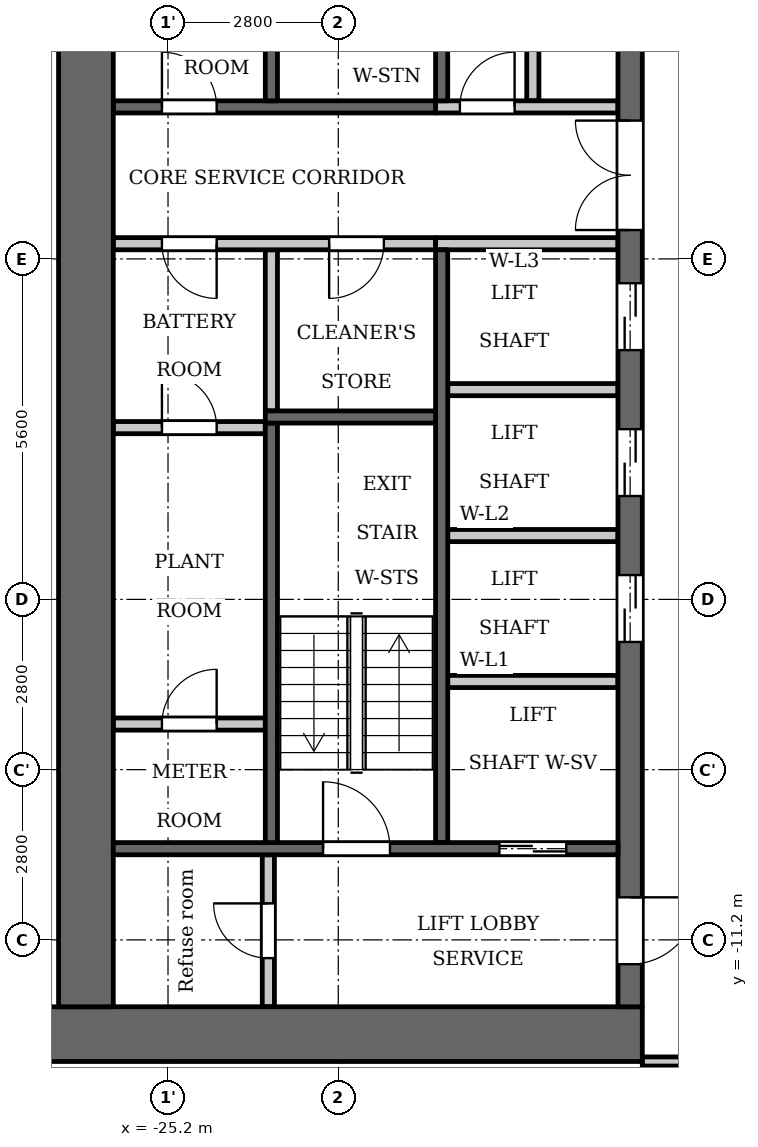
"""IFC4 building model, lengths in metres.
Left out: names, types, materials, properties, quantities, classifications, styles, units other than length and angle.
Written with IfcOpenShell. Run it as: python <this file> out.ifc"""

import sys

from ifc_helpers import new_model, si_unit, direction, frame, frame_2d, origin, place, context, subcontext, project, spatial, rectangle, extrude, element, fill, save


model = new_model("IFC4")
c1 = context("Model", 3, precision=1e-05, world=origin(), true_north=direction((0.0, 1.0)))
c2 = subcontext(c1, "Body", "Model", "MODEL_VIEW")
j1 = project(units=[si_unit("LENGTHUNIT", "METRE"), si_unit("PLANEANGLEUNIT", "RADIAN")], contexts=[c1])
p1 = place(None, origin())
s1 = spatial("IfcSite", under=j1, at=p1, CompositionType="ELEMENT")
p2 = place(p1, origin())
s2 = spatial("IfcBuilding", under=s1, at=p2, CompositionType="ELEMENT")
p3 = place(p2, frame((0.0, 0.0, 48.0)))
s3 = spatial("IfcBuildingStorey", under=s2, at=p3, CompositionType="ELEMENT", Elevation=48.0)
p4 = place(p3, frame((-23.5, -2.5, 0.0), z_axis=(0.0, 0.0, 1.0), x_axis=(0.0, 1.0, 0.0)))
e1 = element("IfcWall", 1, at=p4, inside=s3, PredefinedType="PARTITIONING", context=c2, shape_type="SweptSolid", body=[
    extrude(rectangle(XDim=2.65, YDim=0.2, at=frame_2d((1.325, 0.0))), origin(), (0.0, 0.0, 1.0), 3.2),
])
p5 = place(p3, frame((-20.7, 2.6, 0.0), z_axis=(0.0, 0.0, 1.0), x_axis=(0.0, 1.0, 0.0)))
e2 = element("IfcWall", 2, at=p5, inside=s3, PredefinedType="SHEAR", context=c2, shape_type="SweptSolid", body=[
    extrude(rectangle(XDim=7.0, YDim=0.2, at=frame_2d((3.5, 0.0))), origin(), (0.0, 0.0, 1.0), 3.2),
])
p6 = place(p3, frame((-20.7, -9.6, 0.0), z_axis=(0.0, 0.0, 1.0), x_axis=(0.0, 1.0, 0.0)))
e3 = element("IfcWall", 3, at=p6, inside=s3, PredefinedType="SHEAR", context=c2, shape_type="SweptSolid", body=[
    extrude(rectangle(XDim=9.75, YDim=0.2, at=frame_2d((4.875, 0.0))), origin(), (0.0, 0.0, 1.0), 3.2),
])
p7 = place(p3, frame((-20.8, 2.5, 0.0), z_axis=(0.0, 0.0, 1.0), x_axis=(-1.0, 0.0, 0.0)))
e4 = element("IfcWall", 4, at=p7, inside=s3, PredefinedType="SHEAR", context=c2, shape_type="SweptSolid", body=[
    extrude(rectangle(XDim=5.3, YDim=0.2, at=frame_2d((2.65, 0.0))), origin(), (0.0, 0.0, 1.0), 3.2),
])
p8 = place(p7, frame((3.6, 0.0, 0.0)))
e5 = element("IfcOpeningElement", 5, at=p8, cuts=e4, PredefinedType="OPENING", context=c2, shape_type="SweptSolid", body=[
    extrude(rectangle(XDim=0.9, YDim=2.1, at=frame_2d((0.45, 1.05))), frame((0.0, 0.11, 0.0), z_axis=(0.0, -1.0, 0.0), x_axis=(1.0, 0.0, 0.0)), (0.0, 0.0, 1.0), 0.22),
])
p9 = place(p3, frame((-20.8, 0.25, 0.0), z_axis=(0.0, 0.0, 1.0), x_axis=(-1.0, 0.0, 0.0)))
e6 = element("IfcWall", 6, at=p9, inside=s3, PredefinedType="PARTITIONING", context=c2, shape_type="SweptSolid", body=[
    extrude(rectangle(XDim=5.3, YDim=0.2, at=frame_2d((2.65, 0.0))), origin(), (0.0, 0.0, 1.0), 3.2),
])
p10 = place(p9, frame((0.85, 0.0, 0.0)))
e7 = element("IfcOpeningElement", 7, at=p10, cuts=e6, PredefinedType="OPENING", context=c2, shape_type="SweptSolid", body=[
    extrude(rectangle(XDim=0.9, YDim=2.1, at=frame_2d((0.45, 1.05))), frame((0.0, 0.11, 0.0), z_axis=(0.0, -1.0, 0.0), x_axis=(1.0, 0.0, 0.0)), (0.0, 0.0, 1.0), 0.22),
])
p11 = place(p9, frame((3.6, 0.0, 0.0)))
e8 = element("IfcOpeningElement", 8, at=p11, cuts=e6, PredefinedType="OPENING", context=c2, shape_type="SweptSolid", body=[
    extrude(rectangle(XDim=0.9, YDim=2.1, at=frame_2d((0.45, 1.05))), frame((0.0, 0.11, 0.0), z_axis=(0.0, -1.0, 0.0), x_axis=(1.0, 0.0, 0.0)), (0.0, 0.0, 1.0), 0.22),
])
p12 = place(p3, frame((-17.4, -12.75, 0.0), z_axis=(0.0, 0.0, 1.0), x_axis=(-1.0, 0.0, 0.0)))
e9 = element("IfcWall", 9, at=p12, inside=s3, PredefinedType="SHEAR", context=c2, shape_type="SweptSolid", body=[
    extrude(rectangle(XDim=10.4, YDim=0.9, at=frame_2d((5.2, 0.0))), origin(), (0.0, 0.0, 1.0), 3.2),
])
p13 = place(p3, frame((-19.2, 2.6, 0.0), z_axis=(0.0, 0.0, 1.0), x_axis=(0.0, 1.0, 0.0)))
e10 = element("IfcWall", 10, at=p13, inside=s3, PredefinedType="PARTITIONING", context=c2, shape_type="SweptSolid", body=[
    extrude(rectangle(XDim=4.6, YDim=0.2, at=frame_2d((2.3, 0.0))), origin(), (0.0, 0.0, 1.0), 3.2),
])
p14 = place(p3, frame((-17.6, -12.3, 0.0), z_axis=(0.0, 0.0, 1.0), x_axis=(0.0, 1.0, 0.0)))
e11 = element("IfcWall", 11, at=p14, inside=s3, PredefinedType="SHEAR", context=c2, shape_type="SweptSolid", body=[
    extrude(rectangle(XDim=24.6, YDim=0.4, at=frame_2d((12.3, 0.0))), origin(), (0.0, 0.0, 1.0), 3.2),
])
p15 = place(p14, frame((6.0, 0.0, 0.0)))
e12 = element("IfcOpeningElement", 12, at=p15, cuts=e11, PredefinedType="OPENING", context=c2, shape_type="SweptSolid", body=[
    extrude(rectangle(XDim=1.1, YDim=2.1, at=frame_2d((0.55, 1.05))), frame((0.0, 0.21, 0.0), z_axis=(0.0, -1.0, 0.0), x_axis=(1.0, 0.0, 0.0)), (0.0, 0.0, 1.0), 0.42),
])
p16 = place(p14, frame((8.4, 0.0, 0.0)))
e13 = element("IfcOpeningElement", 13, at=p16, cuts=e11, PredefinedType="OPENING", context=c2, shape_type="SweptSolid", body=[
    extrude(rectangle(XDim=1.1, YDim=2.1, at=frame_2d((0.55, 1.05))), frame((0.0, 0.21, 0.0), z_axis=(0.0, -1.0, 0.0), x_axis=(1.0, 0.0, 0.0)), (0.0, 0.0, 1.0), 0.42),
])
p17 = place(p14, frame((10.8, 0.0, 0.0)))
e14 = element("IfcOpeningElement", 14, at=p17, cuts=e11, PredefinedType="OPENING", context=c2, shape_type="SweptSolid", body=[
    extrude(rectangle(XDim=1.1, YDim=2.1, at=frame_2d((0.55, 1.05))), frame((0.0, 0.21, 0.0), z_axis=(0.0, -1.0, 0.0), x_axis=(1.0, 0.0, 0.0)), (0.0, 0.0, 1.0), 0.42),
])
p18 = place(p14, frame((16.75, 0.0, 0.0)))
e15 = element("IfcOpeningElement", 15, at=p18, cuts=e11, PredefinedType="OPENING", context=c2, shape_type="SweptSolid", body=[
    extrude(rectangle(XDim=0.9, YDim=2.1, at=frame_2d((0.45, 1.05))), frame((0.0, 0.21, 0.0), z_axis=(0.0, -1.0, 0.0), x_axis=(1.0, 0.0, 0.0)), (0.0, 0.0, 1.0), 0.42),
])
p19 = place(p14, frame((22.8, 0.0, 0.0)))
e16 = element("IfcOpeningElement", 16, at=p19, cuts=e11, PredefinedType="OPENING", context=c2, shape_type="SweptSolid", body=[
    extrude(rectangle(XDim=1.1, YDim=2.1, at=frame_2d((0.55, 1.05))), frame((0.0, 0.21, 0.0), z_axis=(0.0, -1.0, 0.0), x_axis=(1.0, 0.0, 0.0)), (0.0, 0.0, 1.0), 0.42),
])
p20 = place(p14, frame((0.7, 0.0, 0.0)))
e17 = element("IfcOpeningElement", 17, at=p20, cuts=e11, PredefinedType="OPENING", context=c2, shape_type="SweptSolid", body=[
    extrude(rectangle(XDim=1.1, YDim=2.1, at=frame_2d((0.55, 1.05))), frame((0.0, 0.21, 0.0), z_axis=(0.0, -1.0, 0.0), x_axis=(1.0, 0.0, 0.0)), (0.0, 0.0, 1.0), 0.42),
])
p21 = place(p14, frame((12.775, 0.0, 0.0)))
e18 = element("IfcOpeningElement", 18, at=p21, cuts=e11, PredefinedType="OPENING", context=c2, shape_type="SweptSolid", body=[
    extrude(rectangle(XDim=1.8, YDim=2.1, at=frame_2d((0.9, 1.05))), frame((0.0, 0.21, 0.0), z_axis=(0.0, -1.0, 0.0), x_axis=(1.0, 0.0, 0.0)), (0.0, 0.0, 1.0), 0.42),
])
p22 = place(p3, frame((-26.55, -12.3, 0.0), z_axis=(0.0, 0.0, 1.0), x_axis=(0.0, 1.0, 0.0)))
e19 = element("IfcWall", 19, at=p22, inside=s3, PredefinedType="SHEAR", context=c2, shape_type="SweptSolid", body=[
    extrude(rectangle(XDim=24.6, YDim=0.9, at=frame_2d((12.3, 0.0))), origin(), (0.0, 0.0, 1.0), 3.2),
])
p23 = place(p3, frame((-23.55, -12.3, 0.0), z_axis=(0.0, 0.0, 1.0), x_axis=(0.0, 1.0, 0.0)))
e20 = element("IfcWall", 20, at=p23, inside=s3, PredefinedType="PARTITIONING", context=c2, shape_type="SweptSolid", body=[
    extrude(rectangle(XDim=2.5, YDim=0.2, at=frame_2d((1.25, 0.0))), origin(), (0.0, 0.0, 1.0), 3.2),
])
p24 = place(p23, frame((0.8, 0.0, 0.0)))
e21 = element("IfcOpeningElement", 21, at=p24, cuts=e20, PredefinedType="OPENING", context=c2, shape_type="SweptSolid", body=[
    extrude(rectangle(XDim=0.9, YDim=2.1, at=frame_2d((0.45, 1.05))), frame((0.0, 0.11, 0.0), z_axis=(0.0, -1.0, 0.0), x_axis=(1.0, 0.0, 0.0)), (0.0, 0.0, 1.0), 0.22),
])
p25 = place(p3, frame((-23.6, -7.65, 0.0), z_axis=(0.0, 0.0, 1.0), x_axis=(-1.0, 0.0, 0.0)))
e22 = element("IfcWall", 22, at=p25, inside=s3, PredefinedType="PARTITIONING", context=c2, shape_type="SweptSolid", body=[
    extrude(rectangle(XDim=2.5, YDim=0.2, at=frame_2d((1.25, 0.0))), origin(), (0.0, 0.0, 1.0), 3.2),
])
p26 = place(p25, frame((0.8, 0.0, 0.0)))
e23 = element("IfcOpeningElement", 23, at=p26, cuts=e22, PredefinedType="OPENING", context=c2, shape_type="SweptSolid", body=[
    extrude(rectangle(XDim=0.9, YDim=2.1, at=frame_2d((0.45, 1.05))), frame((0.0, 0.11, 0.0), z_axis=(0.0, -1.0, 0.0), x_axis=(1.0, 0.0, 0.0)), (0.0, 0.0, 1.0), 0.22),
])
p27 = place(p3, frame((-23.6, -2.775, 0.0), z_axis=(0.0, 0.0, 1.0), x_axis=(-1.0, 0.0, 0.0)))
e24 = element("IfcWall", 24, at=p27, inside=s3, PredefinedType="PARTITIONING", context=c2, shape_type="SweptSolid", body=[
    extrude(rectangle(XDim=2.5, YDim=0.2, at=frame_2d((1.25, 0.0))), origin(), (0.0, 0.0, 1.0), 3.2),
])
p28 = place(p27, frame((0.8, 0.0, 0.0)))
e25 = element("IfcOpeningElement", 25, at=p28, cuts=e24, PredefinedType="OPENING", context=c2, shape_type="SweptSolid", body=[
    extrude(rectangle(XDim=0.9, YDim=2.1, at=frame_2d((0.45, 1.05))), frame((0.0, 0.11, 0.0), z_axis=(0.0, -1.0, 0.0), x_axis=(1.0, 0.0, 0.0)), (0.0, 0.0, 1.0), 0.22),
])
p29 = place(p3, frame((-17.8, -9.7, 0.0), z_axis=(0.0, 0.0, 1.0), x_axis=(-1.0, 0.0, 0.0)))
e26 = element("IfcWall", 26, at=p29, inside=s3, PredefinedType="SHEAR", context=c2, shape_type="SweptSolid", body=[
    extrude(rectangle(XDim=8.3, YDim=0.2, at=frame_2d((4.15, 0.0))), origin(), (0.0, 0.0, 1.0), 3.2),
])
p30 = place(p29, frame((0.85, 0.0, 0.0)))
e27 = element("IfcOpeningElement", 27, at=p30, cuts=e26, PredefinedType="OPENING", context=c2, shape_type="SweptSolid", body=[
    extrude(rectangle(XDim=1.1, YDim=2.1, at=frame_2d((0.55, 1.05))), frame((0.0, 0.11, 0.0), z_axis=(0.0, -1.0, 0.0), x_axis=(1.0, 0.0, 0.0)), (0.0, 0.0, 1.0), 0.22),
])
p31 = place(p29, frame((3.75, 0.0, 0.0)))
e28 = element("IfcOpeningElement", 28, at=p31, cuts=e26, PredefinedType="OPENING", context=c2, shape_type="SweptSolid", body=[
    extrude(rectangle(XDim=1.1, YDim=2.1, at=frame_2d((0.55, 1.05))), frame((0.0, 0.11, 0.0), z_axis=(0.0, -1.0, 0.0), x_axis=(1.0, 0.0, 0.0)), (0.0, 0.0, 1.0), 0.22),
])
for number, where, z_axis, x_axis in (
    (29, (-17.8, -6.95, 0.0), (0.0, 0.0, 1.0), (-1.0, 0.0, 0.0)),
    (30, (-17.8, -4.55, 0.0), (0.0, 0.0, 1.0), (-1.0, 0.0, 0.0)),
    (31, (-17.8, -2.15, 0.0), (0.0, 0.0, 1.0), (-1.0, 0.0, 0.0)),
):
    element("IfcWall", number, at=place(p3, frame(where, z_axis=z_axis, x_axis=x_axis)), inside=s3, PredefinedType="PARTITIONING", context=c2, shape_type="SweptSolid", body=[
        extrude(rectangle(XDim=2.8, YDim=0.2, at=frame_2d((1.4, 0.0))), origin(), (0.0, 0.0, 1.0), 3.2),
    ])
p32 = place(p3, frame((-17.8, 0.25, 0.0), z_axis=(0.0, 0.0, 1.0), x_axis=(-1.0, 0.0, 0.0)))
e32 = element("IfcWall", 32, at=p32, inside=s3, PredefinedType="PARTITIONING", context=c2, shape_type="SweptSolid", body=[
    extrude(rectangle(XDim=3.0, YDim=0.2, at=frame_2d((1.5, 0.0))), origin(), (0.0, 0.0, 1.0), 3.2),
])
p33 = place(p3, frame((-17.8, 2.5, 0.0), z_axis=(0.0, 0.0, 1.0), x_axis=(-1.0, 0.0, 0.0)))
e33 = element("IfcWall", 33, at=p33, inside=s3, PredefinedType="PARTITIONING", context=c2, shape_type="SweptSolid", body=[
    extrude(rectangle(XDim=3.0, YDim=0.2, at=frame_2d((1.5, 0.0))), origin(), (0.0, 0.0, 1.0), 3.2),
])
p34 = place(p33, frame((1.7, 0.0, 0.0)))
e34 = element("IfcOpeningElement", 34, at=p34, cuts=e33, PredefinedType="OPENING", context=c2, shape_type="SweptSolid", body=[
    extrude(rectangle(XDim=0.9, YDim=2.1, at=frame_2d((0.45, 1.05))), frame((0.0, 0.11, 0.0), z_axis=(0.0, -1.0, 0.0), x_axis=(1.0, 0.0, 0.0)), (0.0, 0.0, 1.0), 0.22),
])
p35 = place(p3, frame((-23.5, 2.6, 0.0), z_axis=(0.0, 0.0, 1.0), x_axis=(0.0, 1.0, 0.0)))
e35 = element("IfcWall", 35, at=p35, inside=s3, PredefinedType="SHEAR", context=c2, shape_type="SweptSolid", body=[
    extrude(rectangle(XDim=7.0, YDim=0.2, at=frame_2d((3.5, 0.0))), origin(), (0.0, 0.0, 1.0), 3.2),
])
p36 = place(p3, frame((-23.5, -9.6, 0.0), z_axis=(0.0, 0.0, 1.0), x_axis=(0.0, 1.0, 0.0)))
e36 = element("IfcWall", 36, at=p36, inside=s3, PredefinedType="SHEAR", context=c2, shape_type="SweptSolid", body=[
    extrude(rectangle(XDim=6.9, YDim=0.2, at=frame_2d((3.45, 0.0))), origin(), (0.0, 0.0, 1.0), 3.2),
])
p37 = place(p3, frame((-20.8, -2.6, 0.0), z_axis=(0.0, 0.0, 1.0), x_axis=(-1.0, 0.0, 0.0)))
e37 = element("IfcWall", 37, at=p37, inside=s3, PredefinedType="SHEAR", context=c2, shape_type="SweptSolid", body=[
    extrude(rectangle(XDim=2.8, YDim=0.2, at=frame_2d((1.4, 0.0))), origin(), (0.0, 0.0, 1.0), 3.2),
])
p38 = place(p3, frame((-17.4, -13.2, 0.0), z_axis=(0.0, 0.0, 1.0), x_axis=(1.0, 0.0, 0.0)))
e38 = element("IfcWall", 38, at=p38, inside=s3, PredefinedType="PARTITIONING", context=c2, shape_type="SweptSolid", body=[
    extrude(rectangle(XDim=34.8, YDim=0.15, at=frame_2d((17.4, 0.0))), origin(), (0.0, 0.0, 1.0), 3.2),
])
p39 = place(p38, frame((0.65, 0.0, 0.0)))
e39 = element("IfcOpeningElement", 39, at=p39, cuts=e38, PredefinedType="OPENING", context=c2, shape_type="SweptSolid", body=[
    extrude(rectangle(XDim=1.0, YDim=2.1, at=frame_2d((0.5, 1.05))), frame((0.0, 0.085, 0.0), z_axis=(0.0, -1.0, 0.0), x_axis=(1.0, 0.0, 0.0)), (0.0, 0.0, 1.0), 0.17),
])
p40 = place(p38, frame((33.05, 0.0, 0.0)))
e40 = element("IfcOpeningElement", 40, at=p40, cuts=e38, PredefinedType="OPENING", context=c2, shape_type="SweptSolid", body=[
    extrude(rectangle(XDim=1.0, YDim=2.1, at=frame_2d((0.5, 1.05))), frame((0.0, 0.085, 0.0), z_axis=(0.0, -1.0, 0.0), x_axis=(1.0, 0.0, 0.0)), (0.0, 0.0, 1.0), 0.17),
])
p41 = place(p38, frame((4.55, 0.0, 0.0)))
e41 = element("IfcOpeningElement", 41, at=p41, cuts=e38, PredefinedType="OPENING", context=c2, shape_type="SweptSolid", body=[
    extrude(rectangle(XDim=1.0, YDim=2.1, at=frame_2d((0.5, 1.05))), frame((0.0, 0.085, 0.0), z_axis=(0.0, -1.0, 0.0), x_axis=(1.0, 0.0, 0.0)), (0.0, 0.0, 1.0), 0.17),
])
p42 = place(p38, frame((6.9, 0.0, 0.0)))
e42 = element("IfcOpeningElement", 42, at=p42, cuts=e38, PredefinedType="OPENING", context=c2, shape_type="SweptSolid", body=[
    extrude(rectangle(XDim=1.0, YDim=2.1, at=frame_2d((0.5, 1.05))), frame((0.0, 0.085, 0.0), z_axis=(0.0, -1.0, 0.0), x_axis=(1.0, 0.0, 0.0)), (0.0, 0.0, 1.0), 0.17),
])
p43 = place(p38, frame((15.75, 0.0, 0.0)))
e43 = element("IfcOpeningElement", 43, at=p43, cuts=e38, PredefinedType="OPENING", context=c2, shape_type="SweptSolid", body=[
    extrude(rectangle(XDim=1.0, YDim=2.1, at=frame_2d((0.5, 1.05))), frame((0.0, 0.085, 0.0), z_axis=(0.0, -1.0, 0.0), x_axis=(1.0, 0.0, 0.0)), (0.0, 0.0, 1.0), 0.17),
])
p44 = place(p38, frame((18.1, 0.0, 0.0)))
e44 = element("IfcOpeningElement", 44, at=p44, cuts=e38, PredefinedType="OPENING", context=c2, shape_type="SweptSolid", body=[
    extrude(rectangle(XDim=1.0, YDim=2.1, at=frame_2d((0.5, 1.05))), frame((0.0, 0.085, 0.0), z_axis=(0.0, -1.0, 0.0), x_axis=(1.0, 0.0, 0.0)), (0.0, 0.0, 1.0), 0.17),
])
p45 = place(p38, frame((26.95, 0.0, 0.0)))
e45 = element("IfcOpeningElement", 45, at=p45, cuts=e38, PredefinedType="OPENING", context=c2, shape_type="SweptSolid", body=[
    extrude(rectangle(XDim=1.0, YDim=2.1, at=frame_2d((0.5, 1.05))), frame((0.0, 0.085, 0.0), z_axis=(0.0, -1.0, 0.0), x_axis=(1.0, 0.0, 0.0)), (0.0, 0.0, 1.0), 0.17),
])
p46 = place(p38, frame((29.25, 0.0, 0.0)))
e46 = element("IfcOpeningElement", 46, at=p46, cuts=e38, PredefinedType="OPENING", context=c2, shape_type="SweptSolid", body=[
    extrude(rectangle(XDim=1.0, YDim=2.1, at=frame_2d((0.5, 1.05))), frame((0.0, 0.085, 0.0), z_axis=(0.0, -1.0, 0.0), x_axis=(1.0, 0.0, 0.0)), (0.0, 0.0, 1.0), 0.17),
])
p47 = place(p30, origin())
e47 = element("IfcDoor", 47, at=p47, inside=s3, OperationType="DOUBLE_DOOR_SLIDING", PredefinedType="DOOR", context=c2, shape_type="SweptSolid", body=[
    extrude(rectangle(XDim=1.1, YDim=2.1, at=frame_2d((0.55, 1.05))), frame((0.0, 0.025, 0.0), z_axis=(0.0, -1.0, 0.0), x_axis=(1.0, 0.0, 0.0)), (0.0, 0.0, 1.0), 0.05),
])
fill(e27, e47)
p48 = place(p15, origin())
e48 = element("IfcDoor", 48, at=p48, inside=s3, OperationType="DOUBLE_DOOR_SLIDING", PredefinedType="DOOR", context=c2, shape_type="SweptSolid", body=[
    extrude(rectangle(XDim=1.1, YDim=2.1, at=frame_2d((0.55, 1.05))), frame((0.0, 0.025, 0.0), z_axis=(0.0, -1.0, 0.0), x_axis=(1.0, 0.0, 0.0)), (0.0, 0.0, 1.0), 0.05),
])
fill(e12, e48)
p49 = place(p16, origin())
e49 = element("IfcDoor", 49, at=p49, inside=s3, OperationType="DOUBLE_DOOR_SLIDING", PredefinedType="DOOR", context=c2, shape_type="SweptSolid", body=[
    extrude(rectangle(XDim=1.1, YDim=2.1, at=frame_2d((0.55, 1.05))), frame((0.0, 0.025, 0.0), z_axis=(0.0, -1.0, 0.0), x_axis=(1.0, 0.0, 0.0)), (0.0, 0.0, 1.0), 0.05),
])
fill(e13, e49)
p50 = place(p17, origin())
e50 = element("IfcDoor", 50, at=p50, inside=s3, OperationType="DOUBLE_DOOR_SLIDING", PredefinedType="DOOR", context=c2, shape_type="SweptSolid", body=[
    extrude(rectangle(XDim=1.1, YDim=2.1, at=frame_2d((0.55, 1.05))), frame((0.0, 0.025, 0.0), z_axis=(0.0, -1.0, 0.0), x_axis=(1.0, 0.0, 0.0)), (0.0, 0.0, 1.0), 0.05),
])
fill(e14, e50)
p51 = place(p34, origin())
e51 = element("IfcDoor", 51, at=p51, inside=s3, OperationType="SINGLE_SWING_LEFT", PredefinedType="DOOR", context=c2, shape_type="SweptSolid", body=[
    extrude(rectangle(XDim=0.9, YDim=2.1, at=frame_2d((0.45, 1.05))), frame((0.0, 0.025, 0.0), z_axis=(0.0, -1.0, 0.0), x_axis=(1.0, 0.0, 0.0)), (0.0, 0.0, 1.0), 0.05),
])
fill(e34, e51)
p52 = place(p20, origin())
e52 = element("IfcDoor", 52, at=p52, inside=s3, OperationType="SINGLE_SWING_RIGHT", PredefinedType="DOOR", context=c2, shape_type="SweptSolid", body=[
    extrude(rectangle(XDim=1.1, YDim=2.1, at=frame_2d((0.55, 1.05))), frame((0.0, 0.025, 0.0), z_axis=(0.0, -1.0, 0.0), x_axis=(1.0, 0.0, 0.0)), (0.0, 0.0, 1.0), 0.05),
])
fill(e17, e52)
p53 = place(p24, origin())
e53 = element("IfcDoor", 53, at=p53, inside=s3, OperationType="SINGLE_SWING_LEFT", PredefinedType="DOOR", context=c2, shape_type="SweptSolid", body=[
    extrude(rectangle(XDim=0.9, YDim=2.1, at=frame_2d((0.45, 1.05))), frame((0.0, 0.025, 0.0), z_axis=(0.0, -1.0, 0.0), x_axis=(1.0, 0.0, 0.0)), (0.0, 0.0, 1.0), 0.05),
])
fill(e21, e53)
p54 = place(p31, origin())
e54 = element("IfcDoor", 54, at=p54, inside=s3, OperationType="SINGLE_SWING_RIGHT", PredefinedType="DOOR", context=c2, shape_type="SweptSolid", body=[
    extrude(rectangle(XDim=1.1, YDim=2.1, at=frame_2d((0.55, 1.05))), frame((0.0, 0.025, 0.0), z_axis=(0.0, -1.0, 0.0), x_axis=(1.0, 0.0, 0.0)), (0.0, 0.0, 1.0), 0.05),
])
fill(e28, e54)
p55 = place(p21, origin())
e55 = element("IfcDoor", 55, at=p55, inside=s3, OperationType="DOUBLE_DOOR_SINGLE_SWING", PredefinedType="DOOR", context=c2, shape_type="SweptSolid", body=[
    extrude(rectangle(XDim=1.8, YDim=2.1, at=frame_2d((0.9, 1.05))), frame((0.0, 0.025, 0.0), z_axis=(0.0, -1.0, 0.0), x_axis=(1.0, 0.0, 0.0)), (0.0, 0.0, 1.0), 0.05),
])
fill(e18, e55)
p56 = place(p10, origin())
e56 = element("IfcDoor", 56, at=p56, inside=s3, OperationType="SINGLE_SWING_LEFT", PredefinedType="DOOR", context=c2, shape_type="SweptSolid", body=[
    extrude(rectangle(XDim=0.9, YDim=2.1, at=frame_2d((0.45, 1.05))), frame((0.0, 0.025, 0.0), z_axis=(0.0, -1.0, 0.0), x_axis=(1.0, 0.0, 0.0)), (0.0, 0.0, 1.0), 0.05),
])
fill(e7, e56)
p57 = place(p26, origin())
e57 = element("IfcDoor", 57, at=p57, inside=s3, OperationType="SINGLE_SWING_LEFT", PredefinedType="DOOR", context=c2, shape_type="SweptSolid", body=[
    extrude(rectangle(XDim=0.9, YDim=2.1, at=frame_2d((0.45, 1.05))), frame((0.0, 0.025, 0.0), z_axis=(0.0, -1.0, 0.0), x_axis=(1.0, 0.0, 0.0)), (0.0, 0.0, 1.0), 0.05),
])
fill(e23, e57)
p58 = place(p28, origin())
e58 = element("IfcDoor", 58, at=p58, inside=s3, OperationType="SINGLE_SWING_RIGHT", PredefinedType="DOOR", context=c2, shape_type="SweptSolid", body=[
    extrude(rectangle(XDim=0.9, YDim=2.1, at=frame_2d((0.45, 1.05))), frame((0.0, 0.025, 0.0), z_axis=(0.0, -1.0, 0.0), x_axis=(1.0, 0.0, 0.0)), (0.0, 0.0, 1.0), 0.05),
])
fill(e25, e58)
p59 = place(p11, origin())
e59 = element("IfcDoor", 59, at=p59, inside=s3, OperationType="SINGLE_SWING_RIGHT", PredefinedType="DOOR", context=c2, shape_type="SweptSolid", body=[
    extrude(rectangle(XDim=0.9, YDim=2.1, at=frame_2d((0.45, 1.05))), frame((0.0, 0.025, 0.0), z_axis=(0.0, -1.0, 0.0), x_axis=(1.0, 0.0, 0.0)), (0.0, 0.0, 1.0), 0.05),
])
fill(e8, e59)
p60 = place(p8, origin())
e60 = element("IfcDoor", 60, at=p60, inside=s3, OperationType="SINGLE_SWING_RIGHT", PredefinedType="DOOR", context=c2, shape_type="SweptSolid", body=[
    extrude(rectangle(XDim=0.9, YDim=2.1, at=frame_2d((0.45, 1.05))), frame((0.0, 0.025, 0.0), z_axis=(0.0, -1.0, 0.0), x_axis=(1.0, 0.0, 0.0)), (0.0, 0.0, 1.0), 0.05),
])
fill(e5, e60)
save(model, sys.argv[1])
